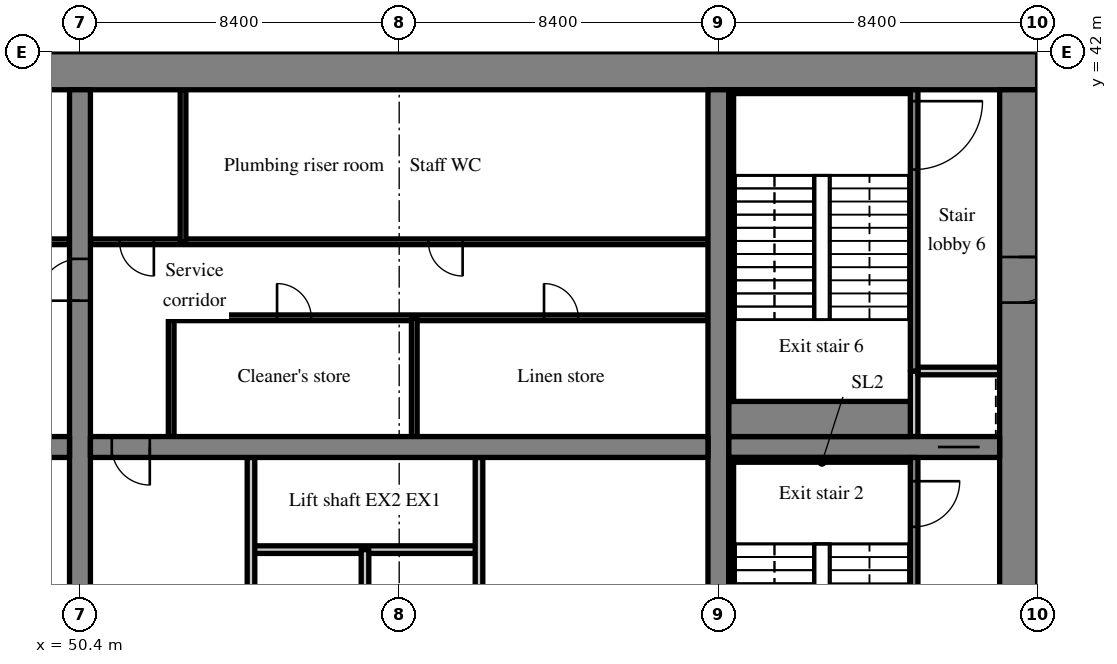
"""IFC4 building model, lengths in metres.
Left out: names, types, materials, properties, quantities, classifications, styles, units other than length and angle.
Written with IfcOpenShell. Run it as: python <this file> out.ifc"""

import sys

from ifc_helpers import new_model, si_unit, direction, frame, frame_2d, origin, place, context, subcontext, project, spatial, rectangle, extrude, source, transform, mapped, element, fill, save


model = new_model("IFC4")
c1 = context("Model", 3, precision=1e-05, world=origin(), true_north=direction((0.0, 1.0)))
c2 = subcontext(c1, "Body", "Model", "MODEL_VIEW")
j1 = project(units=[si_unit("LENGTHUNIT", "METRE"), si_unit("PLANEANGLEUNIT", "RADIAN")], contexts=[c1])
p1 = place(None, origin())
s1 = spatial("IfcSite", under=j1, at=p1, CompositionType="ELEMENT")
p2 = place(p1, origin())
s2 = spatial("IfcBuilding", under=s1, at=p2, CompositionType="ELEMENT")
p3 = place(p2, frame((0.0, 0.0, 46.8)))
s3 = spatial("IfcBuildingStorey", under=s2, at=p3, CompositionType="ELEMENT", Elevation=46.8)
m1 = source(origin(), c2, "Body", "SweptSolid", [
    extrude(rectangle(XDim=50.4, YDim=1.0, at=frame_2d((25.2, 0.0))), origin(), (0.0, 0.0, 1.0), 3.52),
])
p4 = place(p3, frame((25.2, 41.5, 0.0), z_axis=(0.0, 0.0, 1.0), x_axis=(1.0, 0.0, 0.0)))
e1 = element("IfcWall", 1, at=p4, inside=s3, PredefinedType="SHEAR", context=c2, shape_type="MappedRepresentation", body=[
    mapped(m1, transform((0.0, 0.0, 0.0), scale=1.0)),
])
m2 = source(origin(), c2, "Body", "SweptSolid", [
    extrude(rectangle(XDim=18.0, YDim=1.0, at=frame_2d((9.0, 0.0))), origin(), (0.0, 0.0, 1.0), 3.52),
])
p5 = place(p3, frame((75.1, 23.0, 0.0), z_axis=(0.0, 0.0, 1.0), x_axis=(0.0, 1.0, 0.0)))
e2 = element("IfcWall", 2, at=p5, inside=s3, PredefinedType="SHEAR", context=c2, shape_type="MappedRepresentation", body=[
    mapped(m2, transform((0.0, 0.0, 0.0), scale=1.0)),
])
m3 = source(origin(), c2, "Body", "SweptSolid", [
    extrude(rectangle(XDim=1.2, YDim=2.1, at=frame_2d((0.6, 1.05))), frame((0.0, 0.51, 0.0), z_axis=(0.0, -1.0, 0.0), x_axis=(1.0, 0.0, 0.0)), (0.0, 0.0, 1.0), 1.02),
])
p6 = place(p5, frame((12.4, 0.0, 0.0)))
e3 = element("IfcOpeningElement", 3, at=p6, cuts=e2, PredefinedType="OPENING", context=c2, shape_type="MappedRepresentation", body=[
    mapped(m3, transform((0.0, 0.0, 0.0), scale=1.0)),
])
m4 = source(origin(), c2, "Body", "SweptSolid", [
    extrude(rectangle(XDim=18.0, YDim=0.55, at=frame_2d((9.0, 0.0))), origin(), (0.0, 0.0, 1.0), 3.52),
])
p7 = place(p3, frame((50.4, 23.0, 0.0), z_axis=(0.0, 0.0, 1.0), x_axis=(0.0, 1.0, 0.0)))
e4 = element("IfcWall", 4, at=p7, inside=s3, PredefinedType="SHEAR", context=c2, shape_type="MappedRepresentation", body=[
    mapped(m4, transform((0.0, 0.0, 0.0), scale=1.0)),
])
m5 = source(origin(), c2, "Body", "SweptSolid", [
    extrude(rectangle(XDim=1.1, YDim=2.1, at=frame_2d((0.55, 1.05))), frame((0.0, 0.285, 0.0), z_axis=(0.0, -1.0, 0.0), x_axis=(1.0, 0.0, 0.0)), (0.0, 0.0, 1.0), 0.57),
])
p8 = place(p7, frame((12.45, 0.0, 0.0)))
e5 = element("IfcOpeningElement", 5, at=p8, cuts=e4, PredefinedType="OPENING", context=c2, shape_type="MappedRepresentation", body=[
    mapped(m5, transform((0.0, 0.0, 0.0), scale=1.0)),
])
p9 = place(p3, frame((67.2, 23.0, 0.0), z_axis=(0.0, 0.0, 1.0), x_axis=(0.0, 1.0, 0.0)))
e6 = element("IfcWall", 6, at=p9, inside=s3, PredefinedType="SHEAR", context=c2, shape_type="MappedRepresentation", body=[
    mapped(m4, transform((0.0, 0.0, 0.0), scale=1.0)),
])
m6 = source(origin(), c2, "Body", "SweptSolid", [
    extrude(rectangle(XDim=16.25, YDim=0.55, at=frame_2d((8.125, 0.0))), origin(), (0.0, 0.0, 1.0), 3.52),
])
p10 = place(p3, frame((33.875, 31.6, 0.0), z_axis=(0.0, 0.0, 1.0), x_axis=(1.0, 0.0, 0.0)))
e7 = element("IfcWall", 7, at=p10, inside=s3, PredefinedType="SHEAR", context=c2, shape_type="MappedRepresentation", body=[
    mapped(m6, transform((0.0, 0.0, 0.0), scale=1.0)),
])
m7 = source(origin(), c2, "Body", "SweptSolid", [
    extrude(rectangle(XDim=1.0, YDim=2.1, at=frame_2d((0.5, 1.05))), frame((0.0, 0.285, 0.0), z_axis=(0.0, -1.0, 0.0), x_axis=(1.0, 0.0, 0.0)), (0.0, 0.0, 1.0), 0.57),
])
p11 = place(p10, frame((14.687, 0.0, 0.0)))
e8 = element("IfcOpeningElement", 8, at=p11, cuts=e7, PredefinedType="OPENING", context=c2, shape_type="MappedRepresentation", body=[
    mapped(m7, transform((0.0, 0.0, 0.0), scale=1.0)),
])
p12 = place(p3, frame((50.675, 31.6, 0.0), z_axis=(0.0, 0.0, 1.0), x_axis=(1.0, 0.0, 0.0)))
e9 = element("IfcWall", 9, at=p12, inside=s3, PredefinedType="SHEAR", context=c2, shape_type="MappedRepresentation", body=[
    mapped(m6, transform((0.0, 0.0, 0.0), scale=1.0)),
])
p13 = place(p12, frame((0.562, 0.0, 0.0)))
e10 = element("IfcOpeningElement", 10, at=p13, cuts=e9, PredefinedType="OPENING", context=c2, shape_type="MappedRepresentation", body=[
    mapped(m7, transform((0.0, 0.0, 0.0), scale=1.0)),
])
m8 = source(origin(), c2, "Body", "SweptSolid", [
    extrude(rectangle(XDim=7.125, YDim=0.55, at=frame_2d((3.562, 0.0))), origin(), (0.0, 0.0, 1.0), 3.52),
])
p14 = place(p3, frame((67.475, 31.6, 0.0), z_axis=(0.0, 0.0, 1.0), x_axis=(1.0, 0.0, 0.0)))
e11 = element("IfcWall", 11, at=p14, inside=s3, PredefinedType="SHEAR", context=c2, shape_type="MappedRepresentation", body=[
    mapped(m8, transform((0.0, 0.0, 0.0), scale=1.0)),
])
p15 = place(p14, frame((5.5, 0.0, 0.0)))
e12 = element("IfcOpeningElement", 12, at=p15, cuts=e11, PredefinedType="OPENING", context=c2, shape_type="MappedRepresentation", body=[
    mapped(m5, transform((0.0, 0.0, 0.0), scale=1.0)),
])
m9 = source(origin(), c2, "Body", "SweptSolid", [
    extrude(rectangle(XDim=3.559, YDim=0.3, at=frame_2d((1.78, 0.0))), origin(), (0.0, 0.0, 1.0), 3.52),
])
p16 = place(p3, frame((76.523, 43.292, 0.0), z_axis=(0.0, 0.0, 1.0), x_axis=(-0.35779745313, -0.933799219604, 0.0)))
e13 = element("IfcWall", 13, at=p16, inside=s3, PredefinedType="SOLIDWALL", context=c2, shape_type="MappedRepresentation", body=[
    mapped(m9, transform((0.0, 0.0, 0.0), scale=1.0)),
])
m10 = source(origin(), c2, "Body", "SweptSolid", [
    extrude(rectangle(XDim=1.5, YDim=2.0, at=frame_2d((0.75, 1.0))), frame((0.0, 0.16, 0.0), z_axis=(0.0, -1.0, 0.0), x_axis=(1.0, 0.0, 0.0)), (0.0, 0.0, 1.0), 0.32),
])
p17 = place(p16, frame((0.156, 0.0, 0.9)))
e14 = element("IfcOpeningElement", 14, at=p17, cuts=e13, PredefinedType="OPENING", context=c2, shape_type="MappedRepresentation", body=[
    mapped(m10, transform((0.0, 0.0, 0.0), scale=1.0)),
])
m11 = source(origin(), c2, "Body", "SweptSolid", [
    extrude(rectangle(XDim=16.25, YDim=0.15, at=frame_2d((8.125, 0.0))), origin(), (0.0, 0.0, 1.0), 3.52),
])
p18 = place(p3, frame((33.875, 37.0, 0.0), z_axis=(0.0, 0.0, 1.0), x_axis=(1.0, 0.0, 0.0)))
e15 = element("IfcWall", 15, at=p18, inside=s3, PredefinedType="PARTITIONING", context=c2, shape_type="MappedRepresentation", body=[
    mapped(m11, transform((0.0, 0.0, 0.0), scale=1.0)),
])
m12 = source(origin(), c2, "Body", "SweptSolid", [
    extrude(rectangle(XDim=0.9, YDim=2.1, at=frame_2d((0.45, 1.05))), frame((0.0, 0.085, 0.0), z_axis=(0.0, -1.0, 0.0), x_axis=(1.0, 0.0, 0.0)), (0.0, 0.0, 1.0), 0.17),
])
p19 = place(p18, frame((0.769, 0.0, 0.0)))
e16 = element("IfcOpeningElement", 16, at=p19, cuts=e15, PredefinedType="OPENING", context=c2, shape_type="MappedRepresentation", body=[
    mapped(m12, transform((0.0, 0.0, 0.0), scale=1.0)),
])
p20 = place(p18, frame((3.613, 0.0, 0.0)))
e17 = element("IfcOpeningElement", 17, at=p20, cuts=e15, PredefinedType="OPENING", context=c2, shape_type="MappedRepresentation", body=[
    mapped(m12, transform((0.0, 0.0, 0.0), scale=1.0)),
])
p21 = place(p18, frame((9.3, 0.0, 0.0)))
e18 = element("IfcOpeningElement", 18, at=p21, cuts=e15, PredefinedType="OPENING", context=c2, shape_type="MappedRepresentation", body=[
    mapped(m12, transform((0.0, 0.0, 0.0), scale=1.0)),
])
p22 = place(p18, frame((14.581, 0.0, 0.0)))
e19 = element("IfcOpeningElement", 19, at=p22, cuts=e15, PredefinedType="OPENING", context=c2, shape_type="MappedRepresentation", body=[
    mapped(m12, transform((0.0, 0.0, 0.0), scale=1.0)),
])
m13 = source(origin(), c2, "Body", "SweptSolid", [
    extrude(rectangle(XDim=6.0, YDim=0.2, at=frame_2d((3.0, 0.0))), origin(), (0.0, 0.0, 1.0), 3.52),
])
p23 = place(p3, frame((60.9, 28.9, 0.0), z_axis=(0.0, 0.0, 1.0), x_axis=(-1.0, 0.0, 0.0)))
e20 = element("IfcWall", 20, at=p23, inside=s3, PredefinedType="SOLIDWALL", context=c2, shape_type="MappedRepresentation", body=[
    mapped(m13, transform((0.0, 0.0, 0.0), scale=1.0)),
])
m14 = source(origin(), c2, "Body", "SweptSolid", [
    extrude(rectangle(XDim=8.325, YDim=0.2, at=frame_2d((4.163, 0.0))), origin(), (0.0, 0.0, 1.0), 3.52),
])
for number, where, z_axis, x_axis in (
    (21, (54.9, 23.0, 0.0), (0.0, 0.0, 1.0), (0.0, 1.0, 0.0)),
    (22, (60.9, 23.0, 0.0), (0.0, 0.0, 1.0), (0.0, 1.0, 0.0)),
):
    element("IfcWall", number, at=place(p3, frame(where, z_axis=z_axis, x_axis=x_axis)), inside=s3, PredefinedType="PARTITIONING", context=c2, shape_type="MappedRepresentation", body=[
        mapped(m14, transform((0.0, 0.0, 0.0), scale=1.0)),
    ])
m15 = source(origin(), c2, "Body", "SweptSolid", [
    extrude(rectangle(XDim=5.9, YDim=0.2, at=frame_2d((2.95, 0.0))), origin(), (0.0, 0.0, 1.0), 3.52),
])
p24 = place(p3, frame((57.9, 23.0, 0.0), z_axis=(0.0, 0.0, 1.0), x_axis=(0.0, 1.0, 0.0)))
e23 = element("IfcWall", 23, at=p24, inside=s3, PredefinedType="PARTITIONING", context=c2, shape_type="MappedRepresentation", body=[
    mapped(m15, transform((0.0, 0.0, 0.0), scale=1.0)),
])
m16 = source(origin(), c2, "Body", "SweptSolid", [
    extrude(rectangle(XDim=3.125, YDim=0.15, at=frame_2d((1.562, 0.0))), origin(), (0.0, 0.0, 1.0), 3.52),
])
p25 = place(p3, frame((52.8, 31.875, 0.0), z_axis=(0.0, 0.0, 1.0), x_axis=(0.0, 1.0, 0.0)))
e24 = element("IfcWall", 24, at=p25, inside=s3, PredefinedType="PARTITIONING", context=c2, shape_type="MappedRepresentation", body=[
    mapped(m16, transform((0.0, 0.0, 0.0), scale=1.0)),
])
m17 = source(origin(), c2, "Body", "SweptSolid", [
    extrude(rectangle(XDim=14.125, YDim=0.15, at=frame_2d((7.062, 0.0))), origin(), (0.0, 0.0, 1.0), 3.52),
])
p26 = place(p3, frame((66.925, 35.0, 0.0), z_axis=(0.0, 0.0, 1.0), x_axis=(-1.0, 0.0, 0.0)))
e25 = element("IfcWall", 25, at=p26, inside=s3, PredefinedType="PARTITIONING", context=c2, shape_type="MappedRepresentation", body=[
    mapped(m17, transform((0.0, 0.0, 0.0), scale=1.0)),
])
p27 = place(p26, frame((3.414, 0.0, 0.0)))
e26 = element("IfcOpeningElement", 26, at=p27, cuts=e25, PredefinedType="OPENING", context=c2, shape_type="MappedRepresentation", body=[
    mapped(m12, transform((0.0, 0.0, 0.0), scale=1.0)),
])
p28 = place(p26, frame((10.439, 0.0, 0.0)))
e27 = element("IfcOpeningElement", 27, at=p28, cuts=e25, PredefinedType="OPENING", context=c2, shape_type="MappedRepresentation", body=[
    mapped(m12, transform((0.0, 0.0, 0.0), scale=1.0)),
])
p29 = place(p3, frame((66.925, 37.0, 0.0), z_axis=(0.0, 0.0, 1.0), x_axis=(-1.0, 0.0, 0.0)))
e28 = element("IfcWall", 28, at=p29, inside=s3, PredefinedType="PARTITIONING", context=c2, shape_type="MappedRepresentation", body=[
    mapped(m11, transform((0.0, 0.0, 0.0), scale=1.0)),
])
p30 = place(p29, frame((6.456, 0.0, 0.0)))
e29 = element("IfcOpeningElement", 29, at=p30, cuts=e28, PredefinedType="OPENING", context=c2, shape_type="MappedRepresentation", body=[
    mapped(m12, transform((0.0, 0.0, 0.0), scale=1.0)),
])
p31 = place(p29, frame((14.581, 0.0, 0.0)))
e30 = element("IfcOpeningElement", 30, at=p31, cuts=e28, PredefinedType="OPENING", context=c2, shape_type="MappedRepresentation", body=[
    mapped(m12, transform((0.0, 0.0, 0.0), scale=1.0)),
])
p32 = place(p3, frame((59.197, 31.875, 0.0), z_axis=(0.0, 0.0, 1.0), x_axis=(0.0, 1.0, 0.0)))
e31 = element("IfcWall", 31, at=p32, inside=s3, PredefinedType="PARTITIONING", context=c2, shape_type="MappedRepresentation", body=[
    mapped(m16, transform((0.0, 0.0, 0.0), scale=1.0)),
])
m18 = source(origin(), c2, "Body", "SweptSolid", [
    extrude(rectangle(XDim=4.0, YDim=0.15, at=frame_2d((2.0, 0.0))), origin(), (0.0, 0.0, 1.0), 3.52),
])
p33 = place(p3, frame((53.112, 37.0, 0.0), z_axis=(0.0, 0.0, 1.0), x_axis=(0.0, 1.0, 0.0)))
e32 = element("IfcWall", 32, at=p33, inside=s3, PredefinedType="PARTITIONING", context=c2, shape_type="MappedRepresentation", body=[
    mapped(m18, transform((0.0, 0.0, 0.0), scale=1.0)),
])
m19 = source(origin(), c2, "Body", "SweptSolid", [
    extrude(rectangle(XDim=8.325, YDim=0.2, at=frame_2d((4.163, 0.0))), origin(), (0.0, 0.0, 1.0), 3.52),
])
p34 = place(p3, frame((72.35, 23.0, 0.0), z_axis=(0.0, 0.0, 1.0), x_axis=(0.0, 1.0, 0.0)))
e33 = element("IfcWall", 33, at=p34, inside=s3, PredefinedType="SOLIDWALL", context=c2, shape_type="MappedRepresentation", body=[
    mapped(m19, transform((0.0, 0.0, 0.0), scale=1.0)),
])
m20 = source(origin(), c2, "Body", "SweptSolid", [
    extrude(rectangle(XDim=1.2, YDim=2.1, at=frame_2d((0.6, 1.05))), frame((0.0, 0.11, 0.0), z_axis=(0.0, -1.0, 0.0), x_axis=(1.0, 0.0, 0.0)), (0.0, 0.0, 1.0), 0.22),
])
p35 = place(p34, frame((6.5, 0.0, 0.0)))
e34 = element("IfcOpeningElement", 34, at=p35, cuts=e33, PredefinedType="OPENING", context=c2, shape_type="MappedRepresentation", body=[
    mapped(m20, transform((0.0, 0.0, 0.0), scale=1.0)),
])
m21 = source(origin(), c2, "Body", "SweptSolid", [
    extrude(rectangle(XDim=1.725, YDim=0.2, at=frame_2d((0.863, 0.0))), origin(), (0.0, 0.0, 1.0), 3.52),
])
p36 = place(p3, frame((72.35, 31.875, 0.0), z_axis=(0.0, 0.0, 1.0), x_axis=(0.0, 1.0, 0.0)))
e35 = element("IfcWall", 35, at=p36, inside=s3, PredefinedType="SOLIDWALL", context=c2, shape_type="MappedRepresentation", body=[
    mapped(m21, transform((0.0, 0.0, 0.0), scale=1.0)),
])
m22 = source(origin(), c2, "Body", "SweptSolid", [
    extrude(rectangle(XDim=2.15, YDim=0.2, at=frame_2d((1.075, 0.0))), origin(), (0.0, 0.0, 1.0), 3.52),
])
p37 = place(p3, frame((72.45, 33.6, 0.0), z_axis=(0.0, 0.0, 1.0), x_axis=(1.0, 0.0, 0.0)))
e36 = element("IfcWall", 36, at=p37, inside=s3, PredefinedType="SOLIDWALL", context=c2, shape_type="MappedRepresentation", body=[
    mapped(m22, transform((0.0, 0.0, 0.0), scale=1.0)),
])
m23 = source(origin(), c2, "Body", "SweptSolid", [
    extrude(rectangle(XDim=7.4, YDim=0.2, at=frame_2d((3.7, 0.0))), origin(), (0.0, 0.0, 1.0), 3.52),
])
p38 = place(p3, frame((72.35, 33.6, 0.0), z_axis=(0.0, 0.0, 1.0), x_axis=(0.0, 1.0, 0.0)))
e37 = element("IfcWall", 37, at=p38, inside=s3, PredefinedType="SOLIDWALL", context=c2, shape_type="MappedRepresentation", body=[
    mapped(m23, transform((0.0, 0.0, 0.0), scale=1.0)),
])
m24 = source(origin(), c2, "Body", "SweptSolid", [
    extrude(rectangle(XDim=1.8, YDim=2.1, at=frame_2d((0.9, 1.05))), frame((0.0, 0.11, 0.0), z_axis=(0.0, -1.0, 0.0), x_axis=(1.0, 0.0, 0.0)), (0.0, 0.0, 1.0), 0.22),
])
p39 = place(p38, frame((5.3, 0.0, 0.0)))
e38 = element("IfcOpeningElement", 38, at=p39, cuts=e37, PredefinedType="OPENING", context=c2, shape_type="MappedRepresentation", body=[
    mapped(m24, transform((0.0, 0.0, 0.0), scale=1.0)),
])
m25 = source(origin(), c2, "Body", "SweptSolid", [
    extrude(rectangle(XDim=8.2, YDim=0.2, at=frame_2d((4.1, 0.0))), origin(), (0.0, 0.0, 1.0), 3.52),
])
p40 = place(p3, frame((83.8, 30.4, 0.0), z_axis=(0.0, 0.0, 1.0), x_axis=(-1.0, 0.0, 0.0)))
e39 = element("IfcWall", 39, at=p40, inside=s3, PredefinedType="SOLIDWALL", context=c2, shape_type="MappedRepresentation", body=[
    mapped(m25, transform((0.0, 0.0, 0.0), scale=1.0)),
])
m26 = source(origin(), c2, "Body", "SweptSolid", [
    extrude(rectangle(XDim=1.0, YDim=2.1, at=frame_2d((0.5, 1.05))), frame((0.0, 0.11, 0.0), z_axis=(0.0, -1.0, 0.0), x_axis=(1.0, 0.0, 0.0)), (0.0, 0.0, 1.0), 0.22),
])
p41 = place(p40, frame((6.1, 0.0, 0.0)))
e40 = element("IfcOpeningElement", 40, at=p41, cuts=e39, PredefinedType="OPENING", context=c2, shape_type="MappedRepresentation", body=[
    mapped(m26, transform((0.0, 0.0, 0.0), scale=1.0)),
])
m27 = source(origin(), c2, "Body", "SweptSolid", [
    extrude(rectangle(XDim=4.775, YDim=0.125, at=frame_2d((2.387, 0.0))), origin(), (0.0, 0.0, 1.0), 3.52),
])
p42 = place(p3, frame((67.475, 31.262, 0.0), z_axis=(0.0, 0.0, 1.0), x_axis=(1.0, 0.0, 0.0)))
e41 = element("IfcWall", 41, at=p42, inside=s3, PredefinedType="SOLIDWALL", context=c2, shape_type="MappedRepresentation", body=[
    mapped(m27, transform((0.0, 0.0, 0.0), scale=1.0)),
])
m28 = source(origin(), c2, "Body", "SweptSolid", [
    extrude(rectangle(XDim=8.1, YDim=0.125, at=frame_2d((4.05, 0.0))), origin(), (0.0, 0.0, 1.0), 3.52),
])
p43 = place(p3, frame((67.537, 23.1, 0.0), z_axis=(0.0, 0.0, 1.0), x_axis=(0.0, 1.0, 0.0)))
e42 = element("IfcWall", 42, at=p43, inside=s3, PredefinedType="SOLIDWALL", context=c2, shape_type="MappedRepresentation", body=[
    mapped(m28, transform((0.0, 0.0, 0.0), scale=1.0)),
])
m29 = source(origin(), c2, "Body", "SweptSolid", [
    extrude(rectangle(XDim=4.775, YDim=0.1, at=frame_2d((2.387, 0.0))), origin(), (0.0, 0.0, 1.0), 3.52),
])
p44 = place(p3, frame((67.475, 40.95, 0.0), z_axis=(0.0, 0.0, 1.0), x_axis=(1.0, 0.0, 0.0)))
e43 = element("IfcWall", 43, at=p44, inside=s3, PredefinedType="SOLIDWALL", context=c2, shape_type="MappedRepresentation", body=[
    mapped(m29, transform((0.0, 0.0, 0.0), scale=1.0)),
])
m30 = source(origin(), c2, "Body", "SweptSolid", [
    extrude(rectangle(XDim=4.775, YDim=0.925, at=frame_2d((2.387, 0.0))), origin(), (0.0, 0.0, 1.0), 3.52),
])
p45 = place(p3, frame((67.475, 32.337, 0.0), z_axis=(0.0, 0.0, 1.0), x_axis=(1.0, 0.0, 0.0)))
e44 = element("IfcWall", 44, at=p45, inside=s3, PredefinedType="SOLIDWALL", context=c2, shape_type="MappedRepresentation", body=[
    mapped(m30, transform((0.0, 0.0, 0.0), scale=1.0)),
])
p46 = place(p3, frame((67.537, 32.8, 0.0), z_axis=(0.0, 0.0, 1.0), x_axis=(0.0, 1.0, 0.0)))
e45 = element("IfcWall", 45, at=p46, inside=s3, PredefinedType="SOLIDWALL", context=c2, shape_type="MappedRepresentation", body=[
    mapped(m28, transform((0.0, 0.0, 0.0), scale=1.0)),
])
m31 = source(origin(), c2, "Body", "SweptSolid", [
    extrude(rectangle(XDim=1.0, YDim=2.1, at=frame_2d((0.5, 1.05))), frame((0.0, 0.025, 0.0), z_axis=(0.0, -1.0, 0.0), x_axis=(1.0, 0.0, 0.0)), (0.0, 0.0, 1.0), 0.05),
])
p47 = place(p13, origin())
e46 = element("IfcDoor", 46, at=p47, inside=s3, OperationType="SINGLE_SWING_RIGHT", PredefinedType="DOOR", context=c2, shape_type="MappedRepresentation", body=[
    mapped(m31, transform((0.0, 0.0, 0.0), scale=1.0)),
])
fill(e10, e46)
m32 = source(origin(), c2, "Body", "SweptSolid", [
    extrude(rectangle(XDim=0.9, YDim=2.1, at=frame_2d((0.45, 1.05))), frame((0.0, 0.025, 0.0), z_axis=(0.0, -1.0, 0.0), x_axis=(1.0, 0.0, 0.0)), (0.0, 0.0, 1.0), 0.05),
])
p48 = place(p27, origin())
e47 = element("IfcDoor", 47, at=p48, inside=s3, OperationType="SINGLE_SWING_RIGHT", PredefinedType="DOOR", context=c2, shape_type="MappedRepresentation", body=[
    mapped(m32, transform((0.0, 0.0, 0.0), scale=1.0)),
])
fill(e26, e47)
p49 = place(p28, origin())
e48 = element("IfcDoor", 48, at=p49, inside=s3, OperationType="SINGLE_SWING_RIGHT", PredefinedType="DOOR", context=c2, shape_type="MappedRepresentation", body=[
    mapped(m32, transform((0.0, 0.0, 0.0), scale=1.0)),
])
fill(e27, e48)
p50 = place(p30, origin())
e49 = element("IfcDoor", 49, at=p50, inside=s3, OperationType="SINGLE_SWING_LEFT", PredefinedType="DOOR", context=c2, shape_type="MappedRepresentation", body=[
    mapped(m32, transform((0.0, 0.0, 0.0), scale=1.0)),
])
fill(e29, e49)
p51 = place(p31, origin())
e50 = element("IfcDoor", 50, at=p51, inside=s3, OperationType="SINGLE_SWING_LEFT", PredefinedType="DOOR", context=c2, shape_type="MappedRepresentation", body=[
    mapped(m32, transform((0.0, 0.0, 0.0), scale=1.0)),
])
fill(e30, e50)
m33 = source(origin(), c2, "Body", "SweptSolid", [
    extrude(rectangle(XDim=1.2, YDim=2.1, at=frame_2d((0.6, 1.05))), frame((0.0, 0.025, 0.0), z_axis=(0.0, -1.0, 0.0), x_axis=(1.0, 0.0, 0.0)), (0.0, 0.0, 1.0), 0.05),
])
p52 = place(p35, origin())
e51 = element("IfcDoor", 51, at=p52, inside=s3, OperationType="SINGLE_SWING_RIGHT", PredefinedType="DOOR", context=c2, shape_type="MappedRepresentation", body=[
    mapped(m33, transform((0.0, 0.0, 0.0), scale=1.0)),
])
fill(e34, e51)
m34 = source(origin(), c2, "Body", "SweptSolid", [
    extrude(rectangle(XDim=1.1, YDim=2.1, at=frame_2d((0.55, 1.05))), frame((0.0, 0.025, 0.0), z_axis=(0.0, -1.0, 0.0), x_axis=(1.0, 0.0, 0.0)), (0.0, 0.0, 1.0), 0.05),
])
p53 = place(p15, origin())
e52 = element("IfcDoor", 52, at=p53, inside=s3, OperationType="SLIDING_TO_LEFT", PredefinedType="DOOR", context=c2, shape_type="MappedRepresentation", body=[
    mapped(m34, transform((0.0, 0.0, 0.0), scale=1.0)),
])
fill(e12, e52)
m35 = source(origin(), c2, "Body", "SweptSolid", [
    extrude(rectangle(XDim=1.8, YDim=2.1, at=frame_2d((0.9, 1.05))), frame((0.0, 0.025, 0.0), z_axis=(0.0, -1.0, 0.0), x_axis=(1.0, 0.0, 0.0)), (0.0, 0.0, 1.0), 0.05),
])
p54 = place(p39, origin())
e53 = element("IfcDoor", 53, at=p54, inside=s3, OperationType="SINGLE_SWING_RIGHT", PredefinedType="DOOR", context=c2, shape_type="MappedRepresentation", body=[
    mapped(m35, transform((0.0, 0.0, 0.0), scale=1.0)),
])
fill(e38, e53)
p55 = place(p6, origin())
e54 = element("IfcDoor", 54, at=p55, inside=s3, OperationType="SINGLE_SWING_RIGHT", PredefinedType="DOOR", context=c2, shape_type="MappedRepresentation", body=[
    mapped(m33, transform((0.0, 0.0, 0.0), scale=1.0)),
])
fill(e3, e54)
p56 = place(p8, origin())
e55 = element("IfcDoor", 55, at=p56, inside=s3, OperationType="SINGLE_SWING_LEFT", PredefinedType="DOOR", context=c2, shape_type="MappedRepresentation", body=[
    mapped(m34, transform((0.0, 0.0, 0.0), scale=1.0)),
])
fill(e5, e55)
save(model, sys.argv[1])
